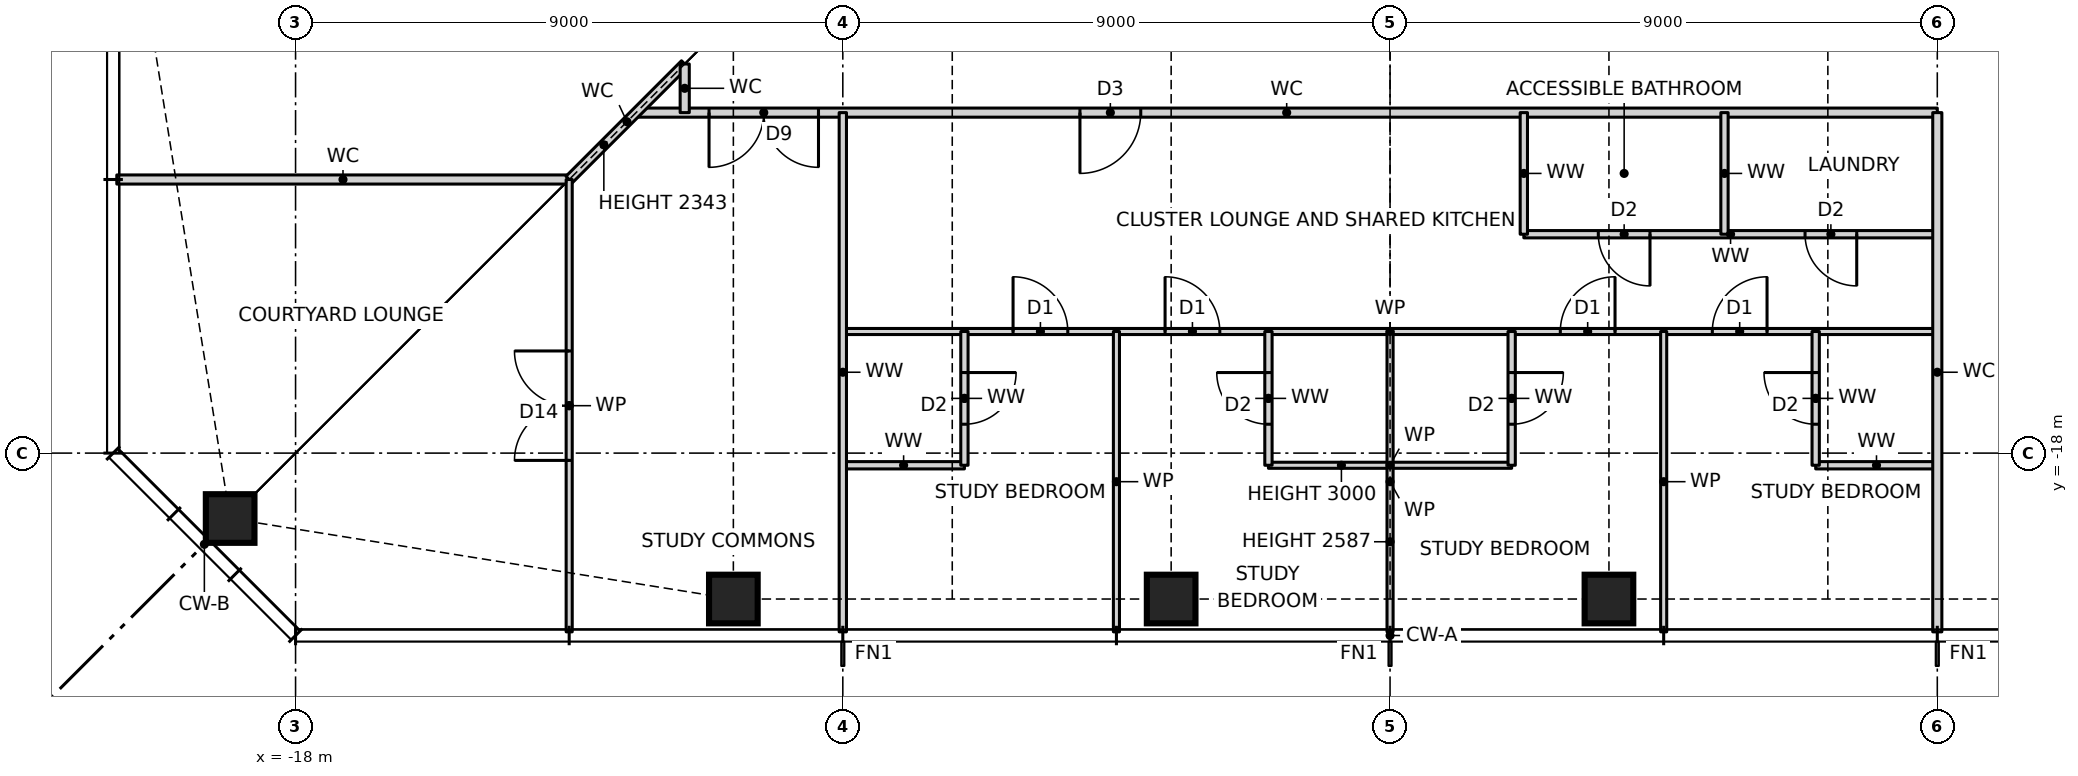
"""IFC4 building model, lengths in metres.
Left out: names, types, materials, properties, quantities, classifications, styles, units other than length and angle.
Written with IfcOpenShell. Run it as: python <this file> out.ifc"""

import sys

from ifc_helpers import new_model, si_unit, direction, frame, frame_2d, origin, origin_2d, place, context, subcontext, project, spatial, rectangle, hollow_rectangle, extrude, element, fill, save


model = new_model("IFC4")
c1 = context("Model", 3, precision=1e-05, world=origin(), true_north=direction((0.0, 1.0)))
c2 = subcontext(c1, "Body", "Model", "MODEL_VIEW")
j1 = project(units=[si_unit("LENGTHUNIT", "METRE"), si_unit("PLANEANGLEUNIT", "RADIAN")], contexts=[c1])
p1 = place(None, origin())
s1 = spatial("IfcSite", under=j1, at=p1, CompositionType="ELEMENT")
p2 = place(p1, origin())
s2 = spatial("IfcBuilding", under=s1, at=p2, CompositionType="ELEMENT")
p3 = place(p2, frame((0.0, 0.0, 91.0)))
s3 = spatial("IfcBuildingStorey", under=s2, at=p3, CompositionType="ELEMENT", Elevation=91.0)
for number, where, z_axis, x_axis in (
    (1, (-19.076, -19.076, 0.0), (0.0, 0.0, 1.0), (1.0, 0.0, 0.0)),
    (2, (-10.8, -20.4, 0.0), (0.0, 0.0, 1.0), (1.0, 0.0, 0.0)),
    (3, (-3.6, -20.4, 0.0), (0.0, 0.0, 1.0), (1.0, 0.0, 0.0)),
    (4, (3.6, -20.4, 0.0), (0.0, 0.0, 1.0), (1.0, 0.0, 0.0)),
):
    element("IfcColumn", number, at=place(p3, frame(where, z_axis=z_axis, x_axis=x_axis)), inside=s3, PredefinedType="COLUMN", context=c2, shape_type="SweptSolid", body=[
        extrude(hollow_rectangle(XDim=0.8, YDim=0.8, WallThickness=0.07, at=origin_2d()), origin(), (0.0, 0.0, 1.0), 3.5),
    ])
p4 = place(p3, frame((-9.0, -18.2, 0.0), z_axis=(0.0, 0.0, 1.0), x_axis=(1.0, 0.0, 0.0)))
e5 = element("IfcWall", 5, at=p4, inside=s3, PredefinedType="PARTITIONING", context=c2, shape_type="SweptSolid", body=[
    extrude(rectangle(XDim=2.0, YDim=0.12, at=frame_2d((1.0, 0.0))), origin(), (0.0, 0.0, 1.0), 3.27),
])
p5 = place(p3, frame((-2.0, -18.2, 0.0), z_axis=(0.0, 0.0, 1.0), x_axis=(1.0, 0.0, 0.0)))
e6 = element("IfcWall", 6, at=p5, inside=s3, PredefinedType="PARTITIONING", context=c2, shape_type="SweptSolid", body=[
    extrude(rectangle(XDim=4.0, YDim=0.1, at=frame_2d((2.0, 0.0))), origin(), (0.0, 0.0, 1.0), 3.0),
])
p6 = place(p3, frame((7.0, -18.2, 0.0), z_axis=(0.0, 0.0, 1.0), x_axis=(1.0, 0.0, 0.0)))
e7 = element("IfcWall", 7, at=p6, inside=s3, PredefinedType="PARTITIONING", context=c2, shape_type="SweptSolid", body=[
    extrude(rectangle(XDim=2.0, YDim=0.12, at=frame_2d((1.0, 0.0))), origin(), (0.0, 0.0, 1.0), 3.27),
])
p7 = place(p3, frame((-9.0, -16.0, 0.0), z_axis=(0.0, 0.0, 1.0), x_axis=(1.0, 0.0, 0.0)))
e8 = element("IfcWall", 8, at=p7, inside=s3, PredefinedType="PARTITIONING", context=c2, shape_type="SweptSolid", body=[
    extrude(rectangle(XDim=18.0, YDim=0.1, at=frame_2d((9.0, 0.0))), origin(), (0.0, 0.0, 1.0), 3.27),
])
p8 = place(p7, frame((2.8, 0.0, 0.0)))
e9 = element("IfcOpeningElement", 9, at=p8, cuts=e8, PredefinedType="OPENING", context=c2, shape_type="SweptSolid", body=[
    extrude(rectangle(XDim=0.9, YDim=2.1, at=frame_2d((0.45, 1.05))), frame((0.0, 0.06, 0.0), z_axis=(0.0, -1.0, 0.0), x_axis=(1.0, 0.0, 0.0)), (0.0, 0.0, 1.0), 0.12),
])
p9 = place(p7, frame((5.3, 0.0, 0.0)))
e10 = element("IfcOpeningElement", 10, at=p9, cuts=e8, PredefinedType="OPENING", context=c2, shape_type="SweptSolid", body=[
    extrude(rectangle(XDim=0.9, YDim=2.1, at=frame_2d((0.45, 1.05))), frame((0.0, 0.06, 0.0), z_axis=(0.0, -1.0, 0.0), x_axis=(1.0, 0.0, 0.0)), (0.0, 0.0, 1.0), 0.12),
])
p10 = place(p7, frame((11.8, 0.0, 0.0)))
e11 = element("IfcOpeningElement", 11, at=p10, cuts=e8, PredefinedType="OPENING", context=c2, shape_type="SweptSolid", body=[
    extrude(rectangle(XDim=0.9, YDim=2.1, at=frame_2d((0.45, 1.05))), frame((0.0, 0.06, 0.0), z_axis=(0.0, -1.0, 0.0), x_axis=(1.0, 0.0, 0.0)), (0.0, 0.0, 1.0), 0.12),
])
p11 = place(p7, frame((14.3, 0.0, 0.0)))
e12 = element("IfcOpeningElement", 12, at=p11, cuts=e8, PredefinedType="OPENING", context=c2, shape_type="SweptSolid", body=[
    extrude(rectangle(XDim=0.9, YDim=2.1, at=frame_2d((0.45, 1.05))), frame((0.0, 0.06, 0.0), z_axis=(0.0, -1.0, 0.0), x_axis=(1.0, 0.0, 0.0)), (0.0, 0.0, 1.0), 0.12),
])
p12 = place(p3, frame((2.2, -14.4, 0.0), z_axis=(0.0, 0.0, 1.0), x_axis=(1.0, 0.0, 0.0)))
e13 = element("IfcWall", 13, at=p12, inside=s3, PredefinedType="PARTITIONING", context=c2, shape_type="SweptSolid", body=[
    extrude(rectangle(XDim=6.8, YDim=0.12, at=frame_2d((3.4, 0.0))), origin(), (0.0, 0.0, 1.0), 3.27),
])
p13 = place(p12, frame((1.225, 0.0, 0.0)))
e14 = element("IfcOpeningElement", 14, at=p13, cuts=e13, PredefinedType="OPENING", context=c2, shape_type="SweptSolid", body=[
    extrude(rectangle(XDim=0.85, YDim=2.1, at=frame_2d((0.425, 1.05))), frame((0.0, 0.07, 0.0), z_axis=(0.0, -1.0, 0.0), x_axis=(1.0, 0.0, 0.0)), (0.0, 0.0, 1.0), 0.14),
])
p14 = place(p12, frame((4.625, 0.0, 0.0)))
e15 = element("IfcOpeningElement", 15, at=p14, cuts=e13, PredefinedType="OPENING", context=c2, shape_type="SweptSolid", body=[
    extrude(rectangle(XDim=0.85, YDim=2.1, at=frame_2d((0.425, 1.05))), frame((0.0, 0.07, 0.0), z_axis=(0.0, -1.0, 0.0), x_axis=(1.0, 0.0, 0.0)), (0.0, 0.0, 1.0), 0.14),
])
p15 = place(p3, frame((-20.94, -13.5, 0.0), z_axis=(0.0, 0.0, 1.0), x_axis=(1.0, 0.0, 0.0)))
e16 = element("IfcWall", 16, at=p15, inside=s3, PredefinedType="PARTITIONING", context=c2, shape_type="SweptSolid", body=[
    extrude(rectangle(XDim=7.44, YDim=0.15, at=frame_2d((3.72, 0.0))), origin(), (0.0, 0.0, 1.0), 3.27),
])
p16 = place(p3, frame((-12.4, -12.4, 0.0), z_axis=(0.0, 0.0, 1.0), x_axis=(1.0, 0.0, 0.0)))
e17 = element("IfcWall", 17, at=p16, inside=s3, PredefinedType="PARTITIONING", context=c2, shape_type="SweptSolid", body=[
    extrude(rectangle(XDim=21.4, YDim=0.15, at=frame_2d((10.7, 0.0))), origin(), (0.0, 0.0, 1.0), 3.27),
])
p17 = place(p16, frame((1.2, 0.0, 0.0)))
e18 = element("IfcOpeningElement", 18, at=p17, cuts=e17, PredefinedType="OPENING", context=c2, shape_type="SweptSolid", body=[
    extrude(rectangle(XDim=1.8, YDim=2.1, at=frame_2d((0.9, 1.05))), frame((0.0, 0.085, 0.0), z_axis=(0.0, -1.0, 0.0), x_axis=(1.0, 0.0, 0.0)), (0.0, 0.0, 1.0), 0.17),
])
p18 = place(p16, frame((7.3, 0.0, 0.0)))
e19 = element("IfcOpeningElement", 19, at=p18, cuts=e17, PredefinedType="OPENING", context=c2, shape_type="SweptSolid", body=[
    extrude(rectangle(XDim=1.0, YDim=2.1, at=frame_2d((0.5, 1.05))), frame((0.0, 0.085, 0.0), z_axis=(0.0, -1.0, 0.0), x_axis=(1.0, 0.0, 0.0)), (0.0, 0.0, 1.0), 0.17),
])
p19 = place(p3, frame((-13.5, -13.5, 0.0), z_axis=(0.0, 0.0, 1.0), x_axis=(0.707106781187, 0.707106781187, 0.0)))
e20 = element("IfcWall", 20, at=p19, inside=s3, PredefinedType="PARTITIONING", context=c2, shape_type="SweptSolid", body=[
    extrude(rectangle(XDim=2.687, YDim=0.15, at=frame_2d((1.343, 0.0))), origin(), (0.0, 0.0, 1.0), 2.343),
])
p20 = place(p3, frame((9.0, -20.94, 0.0), z_axis=(0.0, 0.0, 1.0), x_axis=(0.0, 1.0, 0.0)))
e21 = element("IfcWall", 21, at=p20, inside=s3, PredefinedType="PARTITIONING", context=c2, shape_type="SweptSolid", body=[
    extrude(rectangle(XDim=8.54, YDim=0.15, at=frame_2d((4.27, 0.0))), origin(), (0.0, 0.0, 1.0), 3.27),
])
p21 = place(p3, frame((7.0, -18.2, 0.0), z_axis=(0.0, 0.0, 1.0), x_axis=(0.0, 1.0, 0.0)))
e22 = element("IfcWall", 22, at=p21, inside=s3, PredefinedType="PARTITIONING", context=c2, shape_type="SweptSolid", body=[
    extrude(rectangle(XDim=2.2, YDim=0.12, at=frame_2d((1.1, 0.0))), origin(), (0.0, 0.0, 1.0), 3.27),
])
p22 = place(p21, frame((0.675, 0.0, 0.0)))
e23 = element("IfcOpeningElement", 23, at=p22, cuts=e22, PredefinedType="OPENING", context=c2, shape_type="SweptSolid", body=[
    extrude(rectangle(XDim=0.85, YDim=2.1, at=frame_2d((0.425, 1.05))), frame((0.0, 0.07, 0.0), z_axis=(0.0, -1.0, 0.0), x_axis=(1.0, 0.0, 0.0)), (0.0, 0.0, 1.0), 0.14),
])
p23 = place(p3, frame((5.5, -14.4, 0.0), z_axis=(0.0, 0.0, 1.0), x_axis=(0.0, 1.0, 0.0)))
e24 = element("IfcWall", 24, at=p23, inside=s3, PredefinedType="PARTITIONING", context=c2, shape_type="SweptSolid", body=[
    extrude(rectangle(XDim=2.0, YDim=0.12, at=frame_2d((1.0, 0.0))), origin(), (0.0, 0.0, 1.0), 3.27),
])
p24 = place(p3, frame((4.5, -20.94, 0.0), z_axis=(0.0, 0.0, 1.0), x_axis=(0.0, 1.0, 0.0)))
e25 = element("IfcWall", 25, at=p24, inside=s3, PredefinedType="PARTITIONING", context=c2, shape_type="SweptSolid", body=[
    extrude(rectangle(XDim=4.94, YDim=0.1, at=frame_2d((2.47, 0.0))), origin(), (0.0, 0.0, 1.0), 3.27),
])
p25 = place(p3, frame((2.2, -14.4, 0.0), z_axis=(0.0, 0.0, 1.0), x_axis=(0.0, 1.0, 0.0)))
e26 = element("IfcWall", 26, at=p25, inside=s3, PredefinedType="PARTITIONING", context=c2, shape_type="SweptSolid", body=[
    extrude(rectangle(XDim=2.0, YDim=0.12, at=frame_2d((1.0, 0.0))), origin(), (0.0, 0.0, 1.0), 3.27),
])
p26 = place(p3, frame((2.0, -18.2, 0.0), z_axis=(0.0, 0.0, 1.0), x_axis=(0.0, 1.0, 0.0)))
e27 = element("IfcWall", 27, at=p26, inside=s3, PredefinedType="PARTITIONING", context=c2, shape_type="SweptSolid", body=[
    extrude(rectangle(XDim=2.2, YDim=0.12, at=frame_2d((1.1, 0.0))), origin(), (0.0, 0.0, 1.0), 3.27),
])
p27 = place(p26, frame((0.675, 0.0, 0.0)))
e28 = element("IfcOpeningElement", 28, at=p27, cuts=e27, PredefinedType="OPENING", context=c2, shape_type="SweptSolid", body=[
    extrude(rectangle(XDim=0.85, YDim=2.1, at=frame_2d((0.425, 1.05))), frame((0.0, 0.07, 0.0), z_axis=(0.0, -1.0, 0.0), x_axis=(1.0, 0.0, 0.0)), (0.0, 0.0, 1.0), 0.14),
])
p28 = place(p3, frame((0.0, -20.94, 0.0), z_axis=(0.0, 0.0, 1.0), x_axis=(0.0, 1.0, 0.0)))
e29 = element("IfcWall", 29, at=p28, inside=s3, PredefinedType="PARTITIONING", context=c2, shape_type="SweptSolid", body=[
    extrude(rectangle(XDim=4.94, YDim=0.1, at=frame_2d((2.47, 0.0))), origin(), (0.0, 0.0, 1.0), 2.587),
])
p29 = place(p3, frame((-2.0, -18.2, 0.0), z_axis=(0.0, 0.0, 1.0), x_axis=(0.0, 1.0, 0.0)))
e30 = element("IfcWall", 30, at=p29, inside=s3, PredefinedType="PARTITIONING", context=c2, shape_type="SweptSolid", body=[
    extrude(rectangle(XDim=2.2, YDim=0.12, at=frame_2d((1.1, 0.0))), origin(), (0.0, 0.0, 1.0), 3.27),
])
p30 = place(p29, frame((0.675, 0.0, 0.0)))
e31 = element("IfcOpeningElement", 31, at=p30, cuts=e30, PredefinedType="OPENING", context=c2, shape_type="SweptSolid", body=[
    extrude(rectangle(XDim=0.85, YDim=2.1, at=frame_2d((0.425, 1.05))), frame((0.0, 0.07, 0.0), z_axis=(0.0, -1.0, 0.0), x_axis=(1.0, 0.0, 0.0)), (0.0, 0.0, 1.0), 0.14),
])
p31 = place(p3, frame((-4.5, -20.94, 0.0), z_axis=(0.0, 0.0, 1.0), x_axis=(0.0, 1.0, 0.0)))
e32 = element("IfcWall", 32, at=p31, inside=s3, PredefinedType="PARTITIONING", context=c2, shape_type="SweptSolid", body=[
    extrude(rectangle(XDim=4.94, YDim=0.1, at=frame_2d((2.47, 0.0))), origin(), (0.0, 0.0, 1.0), 3.27),
])
p32 = place(p3, frame((-7.0, -18.2, 0.0), z_axis=(0.0, 0.0, 1.0), x_axis=(0.0, 1.0, 0.0)))
e33 = element("IfcWall", 33, at=p32, inside=s3, PredefinedType="PARTITIONING", context=c2, shape_type="SweptSolid", body=[
    extrude(rectangle(XDim=2.2, YDim=0.12, at=frame_2d((1.1, 0.0))), origin(), (0.0, 0.0, 1.0), 3.27),
])
p33 = place(p32, frame((0.675, 0.0, 0.0)))
e34 = element("IfcOpeningElement", 34, at=p33, cuts=e33, PredefinedType="OPENING", context=c2, shape_type="SweptSolid", body=[
    extrude(rectangle(XDim=0.85, YDim=2.1, at=frame_2d((0.425, 1.05))), frame((0.0, 0.07, 0.0), z_axis=(0.0, -1.0, 0.0), x_axis=(1.0, 0.0, 0.0)), (0.0, 0.0, 1.0), 0.14),
])
p34 = place(p3, frame((-9.0, -20.94, 0.0), z_axis=(0.0, 0.0, 1.0), x_axis=(0.0, 1.0, 0.0)))
e35 = element("IfcWall", 35, at=p34, inside=s3, PredefinedType="PARTITIONING", context=c2, shape_type="SweptSolid", body=[
    extrude(rectangle(XDim=8.54, YDim=0.12, at=frame_2d((4.27, 0.0))), origin(), (0.0, 0.0, 1.0), 3.27),
])
p35 = place(p3, frame((-11.6, -12.4, 0.0), z_axis=(0.0, 0.0, 1.0), x_axis=(0.0, 1.0, 0.0)))
e36 = element("IfcWall", 36, at=p35, inside=s3, PredefinedType="PARTITIONING", context=c2, shape_type="SweptSolid", body=[
    extrude(rectangle(XDim=0.8, YDim=0.15, at=frame_2d((0.4, 0.0))), origin(), (0.0, 0.0, 1.0), 3.27),
])
p36 = place(p3, frame((-13.5, -20.94, 0.0), z_axis=(0.0, 0.0, 1.0), x_axis=(0.0, 1.0, 0.0)))
e37 = element("IfcWall", 37, at=p36, inside=s3, PredefinedType="PARTITIONING", context=c2, shape_type="SweptSolid", body=[
    extrude(rectangle(XDim=7.44, YDim=0.1, at=frame_2d((3.72, 0.0))), origin(), (0.0, 0.0, 1.0), 3.27),
])
p37 = place(p36, frame((2.82, 0.0, 0.0)))
e38 = element("IfcOpeningElement", 38, at=p37, cuts=e37, PredefinedType="OPENING", context=c2, shape_type="SweptSolid", body=[
    extrude(rectangle(XDim=1.8, YDim=2.1, at=frame_2d((0.9, 1.05))), frame((0.0, 0.06, 0.0), z_axis=(0.0, -1.0, 0.0), x_axis=(1.0, 0.0, 0.0)), (0.0, 0.0, 1.0), 0.12),
])
p38 = place(p17, frame((1.8, 0.0, 0.0), z_axis=(0.0, 0.0, 1.0), x_axis=(-1.0, 0.0, 0.0)))
e39 = element("IfcDoor", 39, at=p38, inside=s3, OperationType="DOUBLE_DOOR_SINGLE_SWING", PredefinedType="DOOR", context=c2, shape_type="SweptSolid", body=[
    extrude(rectangle(XDim=1.8, YDim=2.1, at=frame_2d((0.9, 1.05))), frame((0.0, 0.025, 0.0), z_axis=(0.0, -1.0, 0.0), x_axis=(1.0, 0.0, 0.0)), (0.0, 0.0, 1.0), 0.05),
])
fill(e18, e39)
p39 = place(p33, frame((0.85, 0.0, 0.0), z_axis=(0.0, 0.0, 1.0), x_axis=(-1.0, 0.0, 0.0)))
e40 = element("IfcDoor", 40, at=p39, inside=s3, OperationType="SINGLE_SWING_LEFT", PredefinedType="DOOR", context=c2, shape_type="SweptSolid", body=[
    extrude(rectangle(XDim=0.85, YDim=2.1, at=frame_2d((0.425, 1.05))), frame((0.0, 0.025, 0.0), z_axis=(0.0, -1.0, 0.0), x_axis=(1.0, 0.0, 0.0)), (0.0, 0.0, 1.0), 0.05),
])
fill(e34, e40)
p40 = place(p8, origin())
e41 = element("IfcDoor", 41, at=p40, inside=s3, OperationType="SINGLE_SWING_LEFT", PredefinedType="DOOR", context=c2, shape_type="SweptSolid", body=[
    extrude(rectangle(XDim=0.9, YDim=2.1, at=frame_2d((0.45, 1.05))), frame((0.0, 0.025, 0.0), z_axis=(0.0, -1.0, 0.0), x_axis=(1.0, 0.0, 0.0)), (0.0, 0.0, 1.0), 0.05),
])
fill(e9, e41)
p41 = place(p30, origin())
e42 = element("IfcDoor", 42, at=p41, inside=s3, OperationType="SINGLE_SWING_RIGHT", PredefinedType="DOOR", context=c2, shape_type="SweptSolid", body=[
    extrude(rectangle(XDim=0.85, YDim=2.1, at=frame_2d((0.425, 1.05))), frame((0.0, 0.025, 0.0), z_axis=(0.0, -1.0, 0.0), x_axis=(1.0, 0.0, 0.0)), (0.0, 0.0, 1.0), 0.05),
])
fill(e31, e42)
p42 = place(p9, origin())
e43 = element("IfcDoor", 43, at=p42, inside=s3, OperationType="SINGLE_SWING_LEFT", PredefinedType="DOOR", context=c2, shape_type="SweptSolid", body=[
    extrude(rectangle(XDim=0.9, YDim=2.1, at=frame_2d((0.45, 1.05))), frame((0.0, 0.025, 0.0), z_axis=(0.0, -1.0, 0.0), x_axis=(1.0, 0.0, 0.0)), (0.0, 0.0, 1.0), 0.05),
])
fill(e10, e43)
p43 = place(p27, frame((0.85, 0.0, 0.0), z_axis=(0.0, 0.0, 1.0), x_axis=(-1.0, 0.0, 0.0)))
e44 = element("IfcDoor", 44, at=p43, inside=s3, OperationType="SINGLE_SWING_LEFT", PredefinedType="DOOR", context=c2, shape_type="SweptSolid", body=[
    extrude(rectangle(XDim=0.85, YDim=2.1, at=frame_2d((0.425, 1.05))), frame((0.0, 0.025, 0.0), z_axis=(0.0, -1.0, 0.0), x_axis=(1.0, 0.0, 0.0)), (0.0, 0.0, 1.0), 0.05),
])
fill(e28, e44)
p44 = place(p10, origin())
e45 = element("IfcDoor", 45, at=p44, inside=s3, OperationType="SINGLE_SWING_RIGHT", PredefinedType="DOOR", context=c2, shape_type="SweptSolid", body=[
    extrude(rectangle(XDim=0.9, YDim=2.1, at=frame_2d((0.45, 1.05))), frame((0.0, 0.025, 0.0), z_axis=(0.0, -1.0, 0.0), x_axis=(1.0, 0.0, 0.0)), (0.0, 0.0, 1.0), 0.05),
])
fill(e11, e45)
p45 = place(p22, origin())
e46 = element("IfcDoor", 46, at=p45, inside=s3, OperationType="SINGLE_SWING_RIGHT", PredefinedType="DOOR", context=c2, shape_type="SweptSolid", body=[
    extrude(rectangle(XDim=0.85, YDim=2.1, at=frame_2d((0.425, 1.05))), frame((0.0, 0.025, 0.0), z_axis=(0.0, -1.0, 0.0), x_axis=(1.0, 0.0, 0.0)), (0.0, 0.0, 1.0), 0.05),
])
fill(e23, e46)
p46 = place(p11, origin())
e47 = element("IfcDoor", 47, at=p46, inside=s3, OperationType="SINGLE_SWING_RIGHT", PredefinedType="DOOR", context=c2, shape_type="SweptSolid", body=[
    extrude(rectangle(XDim=0.9, YDim=2.1, at=frame_2d((0.45, 1.05))), frame((0.0, 0.025, 0.0), z_axis=(0.0, -1.0, 0.0), x_axis=(1.0, 0.0, 0.0)), (0.0, 0.0, 1.0), 0.05),
])
fill(e12, e47)
p47 = place(p18, frame((1.0, 0.0, 0.0), z_axis=(0.0, 0.0, 1.0), x_axis=(-1.0, 0.0, 0.0)))
e48 = element("IfcDoor", 48, at=p47, inside=s3, OperationType="SINGLE_SWING_RIGHT", PredefinedType="DOOR", context=c2, shape_type="SweptSolid", body=[
    extrude(rectangle(XDim=1.0, YDim=2.1, at=frame_2d((0.5, 1.05))), frame((0.0, 0.025, 0.0), z_axis=(0.0, -1.0, 0.0), x_axis=(1.0, 0.0, 0.0)), (0.0, 0.0, 1.0), 0.05),
])
fill(e19, e48)
p48 = place(p13, frame((0.85, 0.0, 0.0), z_axis=(0.0, 0.0, 1.0), x_axis=(-1.0, 0.0, 0.0)))
e49 = element("IfcDoor", 49, at=p48, inside=s3, OperationType="SINGLE_SWING_LEFT", PredefinedType="DOOR", context=c2, shape_type="SweptSolid", body=[
    extrude(rectangle(XDim=0.85, YDim=2.1, at=frame_2d((0.425, 1.05))), frame((0.0, 0.025, 0.0), z_axis=(0.0, -1.0, 0.0), x_axis=(1.0, 0.0, 0.0)), (0.0, 0.0, 1.0), 0.05),
])
fill(e14, e49)
p49 = place(p14, frame((0.85, 0.0, 0.0), z_axis=(0.0, 0.0, 1.0), x_axis=(-1.0, 0.0, 0.0)))
e50 = element("IfcDoor", 50, at=p49, inside=s3, OperationType="SINGLE_SWING_LEFT", PredefinedType="DOOR", context=c2, shape_type="SweptSolid", body=[
    extrude(rectangle(XDim=0.85, YDim=2.1, at=frame_2d((0.425, 1.05))), frame((0.0, 0.025, 0.0), z_axis=(0.0, -1.0, 0.0), x_axis=(1.0, 0.0, 0.0)), (0.0, 0.0, 1.0), 0.05),
])
fill(e15, e50)
p50 = place(p37, origin())
e51 = element("IfcDoor", 51, at=p50, inside=s3, OperationType="DOUBLE_DOOR_SINGLE_SWING", PredefinedType="DOOR", context=c2, shape_type="SweptSolid", body=[
    extrude(rectangle(XDim=1.8, YDim=2.1, at=frame_2d((0.9, 1.05))), frame((0.0, 0.025, 0.0), z_axis=(0.0, -1.0, 0.0), x_axis=(1.0, 0.0, 0.0)), (0.0, 0.0, 1.0), 0.05),
])
fill(e38, e51)
save(model, sys.argv[1])
